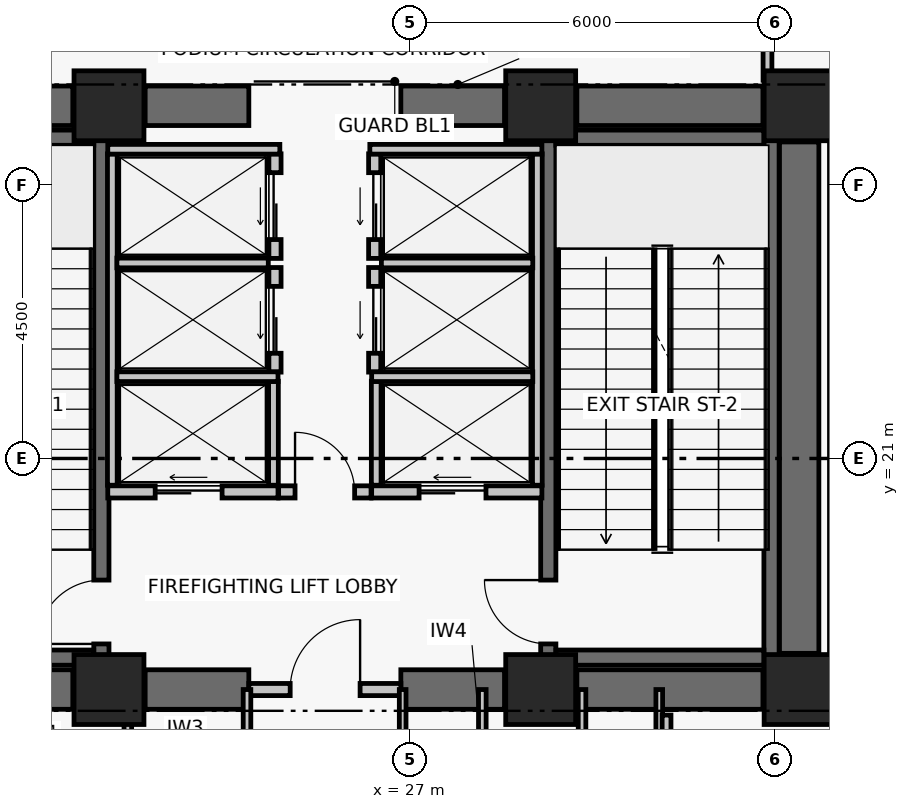
"""IFC4 building model, lengths in metres.
Left out: names, types, materials, properties, quantities, classifications, styles, units other than length and angle.
Written with IfcOpenShell. Run it as: python <this file> out.ifc"""

import sys

from ifc_helpers import new_model, si_unit, direction, frame, frame_2d, origin, origin_2d, place, context, subcontext, project, spatial, rectangle, extrude, element, fill, save


model = new_model("IFC4")
c1 = context("Model", 3, precision=1e-05, world=origin(), true_north=direction((0.0, 1.0)))
c2 = subcontext(c1, "Body", "Model", "MODEL_VIEW")
j1 = project(units=[si_unit("LENGTHUNIT", "METRE"), si_unit("PLANEANGLEUNIT", "RADIAN")], contexts=[c1])
p1 = place(None, origin())
s1 = spatial("IfcSite", under=j1, at=p1, CompositionType="ELEMENT")
p2 = place(p1, origin())
s2 = spatial("IfcBuilding", under=s1, at=p2, CompositionType="ELEMENT")
p3 = place(p2, frame((0.0, 0.0, 22.8)))
s3 = spatial("IfcBuildingStorey", under=s2, at=p3, CompositionType="ELEMENT", Elevation=22.8)
for number, where, z_axis, x_axis in (
    (1, (22.05, 17.2, 0.0), (0.0, 0.0, 1.0), (1.0, 0.0, 0.0)),
    (2, (29.15, 17.2, 0.0), (0.0, 0.0, 1.0), (1.0, 0.0, 0.0)),
    (3, (33.4, 17.2, 0.0), (0.0, 0.0, 1.0), (1.0, 0.0, 0.0)),
    (4, (22.05, 26.8, 0.0), (0.0, 0.0, 1.0), (1.0, 0.0, 0.0)),
    (5, (29.15, 26.8, 0.0), (0.0, 0.0, 1.0), (1.0, 0.0, 0.0)),
    (6, (33.4, 26.8, 0.0), (0.0, 0.0, 1.0), (1.0, 0.0, 0.0)),
):
    element("IfcColumn", number, at=place(p3, frame(where, z_axis=z_axis, x_axis=x_axis)), inside=s3, PredefinedType="COLUMN", context=c2, shape_type="SweptSolid", body=[
        extrude(rectangle(XDim=1.15, YDim=1.15, at=origin_2d()), origin(), (0.0, 0.0, 1.0), 4.8),
    ])
p4 = place(p3, frame((18.395, 17.2, 0.0), z_axis=(0.0, 0.0, 1.0), x_axis=(1.0, 0.0, 0.0)))
e7 = element("IfcWall", 7, at=p4, inside=s3, PredefinedType="SHEAR", context=c2, shape_type="SweptSolid", body=[
    extrude(rectangle(XDim=3.06, YDim=0.65, at=frame_2d((1.53, 0.0))), origin(), (0.0, 0.0, 1.0), 4.55),
])
p5 = place(p3, frame((22.645, 17.2, 0.0), z_axis=(0.0, 0.0, 1.0), x_axis=(1.0, 0.0, 0.0)))
e8 = element("IfcWall", 8, at=p5, inside=s3, PredefinedType="SHEAR", context=c2, shape_type="SweptSolid", body=[
    extrude(rectangle(XDim=1.705, YDim=0.65, at=frame_2d((0.853, 0.0))), origin(), (0.0, 0.0, 1.0), 4.55),
])
p6 = place(p3, frame((26.85, 17.2, 0.0), z_axis=(0.0, 0.0, 1.0), x_axis=(1.0, 0.0, 0.0)))
e9 = element("IfcWall", 9, at=p6, inside=s3, PredefinedType="SHEAR", context=c2, shape_type="SweptSolid", body=[
    extrude(rectangle(XDim=1.705, YDim=0.65, at=frame_2d((0.853, 0.0))), origin(), (0.0, 0.0, 1.0), 4.55),
])
p7 = place(p3, frame((29.745, 17.2, 0.0), z_axis=(0.0, 0.0, 1.0), x_axis=(1.0, 0.0, 0.0)))
e10 = element("IfcWall", 10, at=p7, inside=s3, PredefinedType="SHEAR", context=c2, shape_type="SweptSolid", body=[
    extrude(rectangle(XDim=3.06, YDim=0.65, at=frame_2d((1.53, 0.0))), origin(), (0.0, 0.0, 1.0), 4.55),
])
p8 = place(p3, frame((18.395, 26.8, 0.0), z_axis=(0.0, 0.0, 1.0), x_axis=(1.0, 0.0, 0.0)))
e11 = element("IfcWall", 11, at=p8, inside=s3, PredefinedType="SHEAR", context=c2, shape_type="SweptSolid", body=[
    extrude(rectangle(XDim=3.06, YDim=0.65, at=frame_2d((1.53, 0.0))), origin(), (0.0, 0.0, 1.0), 4.55),
])
p9 = place(p3, frame((22.645, 26.8, 0.0), z_axis=(0.0, 0.0, 1.0), x_axis=(1.0, 0.0, 0.0)))
e12 = element("IfcWall", 12, at=p9, inside=s3, PredefinedType="SHEAR", context=c2, shape_type="SweptSolid", body=[
    extrude(rectangle(XDim=1.705, YDim=0.65, at=frame_2d((0.853, 0.0))), origin(), (0.0, 0.0, 1.0), 4.55),
])
p10 = place(p3, frame((26.85, 26.8, 0.0), z_axis=(0.0, 0.0, 1.0), x_axis=(1.0, 0.0, 0.0)))
e13 = element("IfcWall", 13, at=p10, inside=s3, PredefinedType="SHEAR", context=c2, shape_type="SweptSolid", body=[
    extrude(rectangle(XDim=1.705, YDim=0.65, at=frame_2d((0.853, 0.0))), origin(), (0.0, 0.0, 1.0), 4.55),
])
p11 = place(p3, frame((29.745, 26.8, 0.0), z_axis=(0.0, 0.0, 1.0), x_axis=(1.0, 0.0, 0.0)))
e14 = element("IfcWall", 14, at=p11, inside=s3, PredefinedType="SHEAR", context=c2, shape_type="SweptSolid", body=[
    extrude(rectangle(XDim=3.06, YDim=0.65, at=frame_2d((1.53, 0.0))), origin(), (0.0, 0.0, 1.0), 4.55),
])
p12 = place(p3, frame((33.4, 17.795, 0.0), z_axis=(0.0, 0.0, 1.0), x_axis=(0.0, 1.0, 0.0)))
e15 = element("IfcWall", 15, at=p12, inside=s3, PredefinedType="SHEAR", context=c2, shape_type="SweptSolid", body=[
    extrude(rectangle(XDim=8.41, YDim=0.65, at=frame_2d((4.205, 0.0))), origin(), (0.0, 0.0, 1.0), 4.55),
])
p13 = place(p3, frame((21.925, 17.6, 0.0), z_axis=(0.0, 0.0, 1.0), x_axis=(0.0, 1.0, 0.0)))
e16 = element("IfcWall", 16, at=p13, inside=s3, PredefinedType="SHEAR", context=c2, shape_type="SweptSolid", body=[
    extrude(rectangle(XDim=8.8, YDim=0.25, at=frame_2d((4.4, 0.0))), origin(), (0.0, 0.0, 1.0), 4.55),
])
p14 = place(p13, frame((0.35, 0.0, 0.0)))
e17 = element("IfcOpeningElement", 17, at=p14, cuts=e16, PredefinedType="OPENING", context=c2, shape_type="SweptSolid", body=[
    extrude(rectangle(XDim=1.05, YDim=2.08, at=frame_2d((0.525, 1.04))), frame((0.0, 0.135, 0.0), z_axis=(0.0, -1.0, 0.0), x_axis=(1.0, 0.0, 0.0)), (0.0, 0.0, 1.0), 0.27),
])
for number, where, z_axis, x_axis in (
    (18, (18.379, 17.725, 0.0), (0.0, 0.0, 1.0), (1.0, 0.0, 0.0)),
    (19, (18.379, 26.275, 0.0), (0.0, 0.0, 1.0), (1.0, 0.0, 0.0)),
):
    element("IfcWall", number, at=place(p3, frame(where, z_axis=z_axis, x_axis=x_axis)), inside=s3, PredefinedType="SHEAR", context=c2, shape_type="SweptSolid", body=[
        extrude(rectangle(XDim=3.421, YDim=0.25, at=frame_2d((1.71, 0.0))), origin(), (0.0, 0.0, 1.0), 4.55),
    ])
p15 = place(p3, frame((29.275, 17.6, 0.0), z_axis=(0.0, 0.0, 1.0), x_axis=(0.0, 1.0, 0.0)))
e20 = element("IfcWall", 20, at=p15, inside=s3, PredefinedType="SHEAR", context=c2, shape_type="SweptSolid", body=[
    extrude(rectangle(XDim=8.8, YDim=0.25, at=frame_2d((4.4, 0.0))), origin(), (0.0, 0.0, 1.0), 4.55),
])
p16 = place(p15, frame((0.35, 0.0, 0.0)))
e21 = element("IfcOpeningElement", 21, at=p16, cuts=e20, PredefinedType="OPENING", context=c2, shape_type="SweptSolid", body=[
    extrude(rectangle(XDim=1.05, YDim=2.08, at=frame_2d((0.525, 1.04))), frame((0.0, 0.135, 0.0), z_axis=(0.0, -1.0, 0.0), x_axis=(1.0, 0.0, 0.0)), (0.0, 0.0, 1.0), 0.27),
])
p17 = place(p3, frame((32.946, 17.6, 0.0), z_axis=(0.0, 0.0, 1.0), x_axis=(0.0, 1.0, 0.0)))
e22 = element("IfcWall", 22, at=p17, inside=s3, PredefinedType="SHEAR", context=c2, shape_type="SweptSolid", body=[
    extrude(rectangle(XDim=8.8, YDim=0.25, at=frame_2d((4.4, 0.0))), origin(), (0.0, 0.0, 1.0), 4.55),
])
for number, where, z_axis, x_axis in (
    (23, (29.4, 17.725, 0.0), (0.0, 0.0, 1.0), (1.0, 0.0, 0.0)),
    (24, (29.4, 26.275, 0.0), (0.0, 0.0, 1.0), (1.0, 0.0, 0.0)),
):
    element("IfcWall", number, at=place(p3, frame(where, z_axis=z_axis, x_axis=x_axis)), inside=s3, PredefinedType="SHEAR", context=c2, shape_type="SweptSolid", body=[
        extrude(rectangle(XDim=3.421, YDim=0.25, at=frame_2d((1.71, 0.0))), origin(), (0.0, 0.0, 1.0), 4.55),
    ])
p18 = place(p3, frame((24.35, 17.2, 0.0), z_axis=(0.0, 0.0, 1.0), x_axis=(1.0, 0.0, 0.0)))
e25 = element("IfcWall", 25, at=p18, inside=s3, PredefinedType="PARTITIONING", context=c2, shape_type="SweptSolid", body=[
    extrude(rectangle(XDim=2.5, YDim=0.2, at=frame_2d((1.25, 0.0))), origin(), (0.0, 0.0, 1.0), 3.68),
])
p19 = place(p18, frame((0.68, 0.0, 0.0)))
e26 = element("IfcOpeningElement", 26, at=p19, cuts=e25, PredefinedType="OPENING", context=c2, shape_type="SweptSolid", body=[
    extrude(rectangle(XDim=1.15, YDim=2.08, at=frame_2d((0.575, 1.04))), frame((0.0, 0.11, 0.0), z_axis=(0.0, -1.0, 0.0), x_axis=(1.0, 0.0, 0.0)), (0.0, 0.0, 1.0), 0.22),
])
p20 = place(p3, frame((24.84, 20.45, 0.0), z_axis=(0.0, 0.0, 1.0), x_axis=(1.0, 0.0, 0.0)))
e27 = element("IfcWall", 27, at=p20, inside=s3, PredefinedType="PARTITIONING", context=c2, shape_type="SweptSolid", body=[
    extrude(rectangle(XDim=1.52, YDim=0.2, at=frame_2d((0.76, 0.0))), origin(), (0.0, 0.0, 1.0), 4.55),
])
p21 = place(p20, frame((0.27, 0.0, 0.0)))
e28 = element("IfcOpeningElement", 28, at=p21, cuts=e27, PredefinedType="OPENING", context=c2, shape_type="SweptSolid", body=[
    extrude(rectangle(XDim=0.98, YDim=2.06, at=frame_2d((0.49, 1.03))), frame((0.0, 0.11, 0.0), z_axis=(0.0, -1.0, 0.0), x_axis=(1.0, 0.0, 0.0)), (0.0, 0.0, 1.0), 0.22),
])
p22 = place(p3, frame((22.03, 20.45, 0.0), z_axis=(0.0, 0.0, 1.0), x_axis=(1.0, 0.0, 0.0)))
e29 = element("IfcWall", 29, at=p22, inside=s3, PredefinedType="PARTITIONING", context=c2, shape_type="SweptSolid", body=[
    extrude(rectangle(XDim=2.8, YDim=0.2, at=frame_2d((1.4, 0.0))), origin(), (0.0, 0.0, 1.0), 4.55),
])
p23 = place(p22, frame((0.78, 0.0, 0.0)))
e30 = element("IfcOpeningElement", 30, at=p23, cuts=e29, PredefinedType="OPENING", context=c2, shape_type="SweptSolid", body=[
    extrude(rectangle(XDim=1.1, YDim=2.08, at=frame_2d((0.55, 1.04))), frame((0.0, 0.11, 0.0), z_axis=(0.0, -1.0, 0.0), x_axis=(1.0, 0.0, 0.0)), (0.0, 0.0, 1.0), 0.22),
])
p24 = place(p3, frame((26.37, 20.45, 0.0), z_axis=(0.0, 0.0, 1.0), x_axis=(1.0, 0.0, 0.0)))
e31 = element("IfcWall", 31, at=p24, inside=s3, PredefinedType="PARTITIONING", context=c2, shape_type="SweptSolid", body=[
    extrude(rectangle(XDim=2.8, YDim=0.2, at=frame_2d((1.4, 0.0))), origin(), (0.0, 0.0, 1.0), 4.55),
])
p25 = place(p24, frame((0.78, 0.0, 0.0)))
e32 = element("IfcOpeningElement", 32, at=p25, cuts=e31, PredefinedType="OPENING", context=c2, shape_type="SweptSolid", body=[
    extrude(rectangle(XDim=1.1, YDim=2.08, at=frame_2d((0.55, 1.04))), frame((0.0, 0.11, 0.0), z_axis=(0.0, -1.0, 0.0), x_axis=(1.0, 0.0, 0.0)), (0.0, 0.0, 1.0), 0.22),
])
p26 = place(p3, frame((24.78, 22.42, 0.0), z_axis=(0.0, 0.0, 1.0), x_axis=(0.0, 1.0, 0.0)))
e33 = element("IfcWall", 33, at=p26, inside=s3, PredefinedType="PARTITIONING", context=c2, shape_type="SweptSolid", body=[
    extrude(rectangle(XDim=1.72, YDim=0.2, at=frame_2d((0.86, 0.0))), origin(), (0.0, 0.0, 1.0), 4.55),
])
p27 = place(p26, frame((0.31, 0.0, 0.0)))
e34 = element("IfcOpeningElement", 34, at=p27, cuts=e33, PredefinedType="OPENING", context=c2, shape_type="SweptSolid", body=[
    extrude(rectangle(XDim=1.1, YDim=2.08, at=frame_2d((0.55, 1.04))), frame((0.0, 0.11, 0.0), z_axis=(0.0, -1.0, 0.0), x_axis=(1.0, 0.0, 0.0)), (0.0, 0.0, 1.0), 0.22),
])
p28 = place(p3, frame((24.78, 24.29, 0.0), z_axis=(0.0, 0.0, 1.0), x_axis=(0.0, 1.0, 0.0)))
e35 = element("IfcWall", 35, at=p28, inside=s3, PredefinedType="PARTITIONING", context=c2, shape_type="SweptSolid", body=[
    extrude(rectangle(XDim=1.72, YDim=0.2, at=frame_2d((0.86, 0.0))), origin(), (0.0, 0.0, 1.0), 4.55),
])
p29 = place(p28, frame((0.31, 0.0, 0.0)))
e36 = element("IfcOpeningElement", 36, at=p29, cuts=e35, PredefinedType="OPENING", context=c2, shape_type="SweptSolid", body=[
    extrude(rectangle(XDim=1.1, YDim=2.08, at=frame_2d((0.55, 1.04))), frame((0.0, 0.11, 0.0), z_axis=(0.0, -1.0, 0.0), x_axis=(1.0, 0.0, 0.0)), (0.0, 0.0, 1.0), 0.22),
])
p30 = place(p3, frame((26.42, 22.42, 0.0), z_axis=(0.0, 0.0, 1.0), x_axis=(0.0, 1.0, 0.0)))
e37 = element("IfcWall", 37, at=p30, inside=s3, PredefinedType="PARTITIONING", context=c2, shape_type="SweptSolid", body=[
    extrude(rectangle(XDim=1.72, YDim=0.2, at=frame_2d((0.86, 0.0))), origin(), (0.0, 0.0, 1.0), 4.55),
])
p31 = place(p30, frame((0.31, 0.0, 0.0)))
e38 = element("IfcOpeningElement", 38, at=p31, cuts=e37, PredefinedType="OPENING", context=c2, shape_type="SweptSolid", body=[
    extrude(rectangle(XDim=1.1, YDim=2.08, at=frame_2d((0.55, 1.04))), frame((0.0, 0.11, 0.0), z_axis=(0.0, -1.0, 0.0), x_axis=(1.0, 0.0, 0.0)), (0.0, 0.0, 1.0), 0.22),
])
p32 = place(p3, frame((26.42, 24.29, 0.0), z_axis=(0.0, 0.0, 1.0), x_axis=(0.0, 1.0, 0.0)))
e39 = element("IfcWall", 39, at=p32, inside=s3, PredefinedType="PARTITIONING", context=c2, shape_type="SweptSolid", body=[
    extrude(rectangle(XDim=1.72, YDim=0.2, at=frame_2d((0.86, 0.0))), origin(), (0.0, 0.0, 1.0), 4.55),
])
p33 = place(p32, frame((0.31, 0.0, 0.0)))
e40 = element("IfcOpeningElement", 40, at=p33, cuts=e39, PredefinedType="OPENING", context=c2, shape_type="SweptSolid", body=[
    extrude(rectangle(XDim=1.1, YDim=2.08, at=frame_2d((0.55, 1.04))), frame((0.0, 0.11, 0.0), z_axis=(0.0, -1.0, 0.0), x_axis=(1.0, 0.0, 0.0)), (0.0, 0.0, 1.0), 0.22),
])
p34 = place(p3, frame((22.105, 20.56, 0.0), z_axis=(0.0, 0.0, 1.0), x_axis=(0.0, 1.0, 0.0)))
e41 = element("IfcWall", 41, at=p34, inside=s3, PredefinedType="PARTITIONING", context=c2, shape_type="SweptSolid", body=[
    extrude(rectangle(XDim=5.45, YDim=0.16, at=frame_2d((2.725, 0.0))), origin(), (0.0, 0.0, 1.0), 4.55),
])
p35 = place(p3, frame((24.755, 20.56, 0.0), z_axis=(0.0, 0.0, 1.0), x_axis=(0.0, 1.0, 0.0)))
e42 = element("IfcWall", 42, at=p35, inside=s3, PredefinedType="PARTITIONING", context=c2, shape_type="SweptSolid", body=[
    extrude(rectangle(XDim=1.71, YDim=0.16, at=frame_2d((0.855, 0.0))), origin(), (0.0, 0.0, 1.0), 4.55),
])
p36 = place(p3, frame((22.18, 22.345, 0.0), z_axis=(0.0, 0.0, 1.0), x_axis=(1.0, 0.0, 0.0)))
e43 = element("IfcWall", 43, at=p36, inside=s3, PredefinedType="PARTITIONING", context=c2, shape_type="SweptSolid", body=[
    extrude(rectangle(XDim=2.65, YDim=0.16, at=frame_2d((1.325, 0.0))), origin(), (0.0, 0.0, 1.0), 4.55),
])
p37 = place(p3, frame((22.18, 24.215, 0.0), z_axis=(0.0, 0.0, 1.0), x_axis=(1.0, 0.0, 0.0)))
e44 = element("IfcWall", 44, at=p37, inside=s3, PredefinedType="PARTITIONING", context=c2, shape_type="SweptSolid", body=[
    extrude(rectangle(XDim=2.49, YDim=0.16, at=frame_2d((1.245, 0.0))), origin(), (0.0, 0.0, 1.0), 4.55),
])
p38 = place(p3, frame((22.03, 26.085, 0.0), z_axis=(0.0, 0.0, 1.0), x_axis=(1.0, 0.0, 0.0)))
e45 = element("IfcWall", 45, at=p38, inside=s3, PredefinedType="PARTITIONING", context=c2, shape_type="SweptSolid", body=[
    extrude(rectangle(XDim=2.83, YDim=0.16, at=frame_2d((1.415, 0.0))), origin(), (0.0, 0.0, 1.0), 4.55),
])
p39 = place(p3, frame((29.095, 20.56, 0.0), z_axis=(0.0, 0.0, 1.0), x_axis=(0.0, 1.0, 0.0)))
e46 = element("IfcWall", 46, at=p39, inside=s3, PredefinedType="PARTITIONING", context=c2, shape_type="SweptSolid", body=[
    extrude(rectangle(XDim=5.45, YDim=0.16, at=frame_2d((2.725, 0.0))), origin(), (0.0, 0.0, 1.0), 4.55),
])
p40 = place(p3, frame((26.445, 20.56, 0.0), z_axis=(0.0, 0.0, 1.0), x_axis=(0.0, 1.0, 0.0)))
e47 = element("IfcWall", 47, at=p40, inside=s3, PredefinedType="PARTITIONING", context=c2, shape_type="SweptSolid", body=[
    extrude(rectangle(XDim=1.71, YDim=0.16, at=frame_2d((0.855, 0.0))), origin(), (0.0, 0.0, 1.0), 4.55),
])
p41 = place(p3, frame((26.37, 22.345, 0.0), z_axis=(0.0, 0.0, 1.0), x_axis=(1.0, 0.0, 0.0)))
e48 = element("IfcWall", 48, at=p41, inside=s3, PredefinedType="PARTITIONING", context=c2, shape_type="SweptSolid", body=[
    extrude(rectangle(XDim=2.65, YDim=0.16, at=frame_2d((1.325, 0.0))), origin(), (0.0, 0.0, 1.0), 4.55),
])
p42 = place(p3, frame((26.53, 24.215, 0.0), z_axis=(0.0, 0.0, 1.0), x_axis=(1.0, 0.0, 0.0)))
e49 = element("IfcWall", 49, at=p42, inside=s3, PredefinedType="PARTITIONING", context=c2, shape_type="SweptSolid", body=[
    extrude(rectangle(XDim=2.49, YDim=0.16, at=frame_2d((1.245, 0.0))), origin(), (0.0, 0.0, 1.0), 4.55),
])
p43 = place(p3, frame((26.34, 26.085, 0.0), z_axis=(0.0, 0.0, 1.0), x_axis=(1.0, 0.0, 0.0)))
e50 = element("IfcWall", 50, at=p43, inside=s3, PredefinedType="PARTITIONING", context=c2, shape_type="SweptSolid", body=[
    extrude(rectangle(XDim=2.83, YDim=0.16, at=frame_2d((1.415, 0.0))), origin(), (0.0, 0.0, 1.0), 4.55),
])
p44 = place(p3, frame((22.36, 14.95, 0.0), z_axis=(0.0, 0.0, 1.0), x_axis=(0.0, 1.0, 0.0)))
e51 = element("IfcWall", 51, at=p44, inside=s3, PredefinedType="PARTITIONING", context=c2, shape_type="SweptSolid", body=[
    extrude(rectangle(XDim=2.25, YDim=0.125, at=frame_2d((1.125, 0.0))), origin(), (0.0, 0.0, 1.0), 3.13),
])
p45 = place(p3, frame((24.32, 14.95, 0.0), z_axis=(0.0, 0.0, 1.0), x_axis=(0.0, 1.0, 0.0)))
e52 = element("IfcWall", 52, at=p45, inside=s3, PredefinedType="PARTITIONING", context=c2, shape_type="SweptSolid", body=[
    extrude(rectangle(XDim=2.25, YDim=0.125, at=frame_2d((1.125, 0.0))), origin(), (0.0, 0.0, 1.0), 3.68),
])
p46 = place(p3, frame((26.88, 14.95, 0.0), z_axis=(0.0, 0.0, 1.0), x_axis=(0.0, 1.0, 0.0)))
e53 = element("IfcWall", 53, at=p46, inside=s3, PredefinedType="PARTITIONING", context=c2, shape_type="SweptSolid", body=[
    extrude(rectangle(XDim=2.25, YDim=0.11, at=frame_2d((1.125, 0.0))), origin(), (0.0, 0.0, 1.0), 3.68),
])
for number, where, z_axis, x_axis in (
    (54, (28.19, 14.95, 0.0), (0.0, 0.0, 1.0), (0.0, 1.0, 0.0)),
    (55, (29.83, 14.95, 0.0), (0.0, 0.0, 1.0), (0.0, 1.0, 0.0)),
):
    element("IfcWall", number, at=place(p3, frame(where, z_axis=z_axis, x_axis=x_axis)), inside=s3, PredefinedType="PARTITIONING", context=c2, shape_type="SweptSolid", body=[
        extrude(rectangle(XDim=2.25, YDim=0.125, at=frame_2d((1.125, 0.0))), origin(), (0.0, 0.0, 1.0), 3.68),
    ])
p47 = place(p3, frame((31.1, 14.95, 0.0), z_axis=(0.0, 0.0, 1.0), x_axis=(0.0, 1.0, 0.0)))
e56 = element("IfcWall", 56, at=p47, inside=s3, PredefinedType="PARTITIONING", context=c2, shape_type="SweptSolid", body=[
    extrude(rectangle(XDim=2.25, YDim=0.11, at=frame_2d((1.125, 0.0))), origin(), (0.0, 0.0, 1.0), 3.68),
])
p48 = place(p3, frame((31.22, 14.93, 0.0), z_axis=(0.0, 0.0, 1.0), x_axis=(0.0, 1.0, 0.0)))
e57 = element("IfcWall", 57, at=p48, inside=s3, PredefinedType="PARTITIONING", context=c2, shape_type="SweptSolid", body=[
    extrude(rectangle(XDim=1.85, YDim=0.145, at=frame_2d((0.925, 0.0))), origin(), (0.0, 0.0, 1.0), 3.68),
])
p49 = place(p3, frame((33.74, 27.22, 0.0), z_axis=(0.0, 0.0, 1.0), x_axis=(-1.0, 0.0, 0.0)))
e58 = element("IfcWall", 58, at=p49, inside=s3, PredefinedType="PARTITIONING", context=c2, shape_type="SweptSolid", body=[
    extrude(rectangle(XDim=0.86, YDim=0.145, at=frame_2d((0.43, 0.0))), origin(), (0.0, 0.0, 1.0), 3.13),
])
p50 = place(p3, frame((32.88, 27.22, 0.0), z_axis=(0.0, 0.0, 1.0), x_axis=(0.0, 1.0, 0.0)))
e59 = element("IfcWall", 59, at=p50, inside=s3, PredefinedType="PARTITIONING", context=c2, shape_type="SweptSolid", body=[
    extrude(rectangle(XDim=1.48, YDim=0.145, at=frame_2d((0.74, 0.0))), origin(), (0.0, 0.0, 1.0), 3.68),
])
p51 = place(p14, origin())
e60 = element("IfcDoor", 60, at=p51, inside=s3, OperationType="SINGLE_SWING_LEFT", PredefinedType="DOOR", context=c2, shape_type="SweptSolid", body=[
    extrude(rectangle(XDim=1.05, YDim=2.08, at=frame_2d((0.525, 1.04))), frame((0.0, 0.025, 0.0), z_axis=(0.0, -1.0, 0.0), x_axis=(1.0, 0.0, 0.0)), (0.0, 0.0, 1.0), 0.05),
])
fill(e17, e60)
p52 = place(p16, origin())
e61 = element("IfcDoor", 61, at=p52, inside=s3, OperationType="SINGLE_SWING_RIGHT", PredefinedType="DOOR", context=c2, shape_type="SweptSolid", body=[
    extrude(rectangle(XDim=1.05, YDim=2.08, at=frame_2d((0.525, 1.04))), frame((0.0, 0.025, 0.0), z_axis=(0.0, -1.0, 0.0), x_axis=(1.0, 0.0, 0.0)), (0.0, 0.0, 1.0), 0.05),
])
fill(e21, e61)
p53 = place(p19, origin())
e62 = element("IfcDoor", 62, at=p53, inside=s3, OperationType="SINGLE_SWING_RIGHT", PredefinedType="DOOR", context=c2, shape_type="SweptSolid", body=[
    extrude(rectangle(XDim=1.15, YDim=2.08, at=frame_2d((0.575, 1.04))), frame((0.0, 0.025, 0.0), z_axis=(0.0, -1.0, 0.0), x_axis=(1.0, 0.0, 0.0)), (0.0, 0.0, 1.0), 0.05),
])
fill(e26, e62)
p54 = place(p21, origin())
e63 = element("IfcDoor", 63, at=p54, inside=s3, OperationType="SINGLE_SWING_LEFT", PredefinedType="DOOR", context=c2, shape_type="SweptSolid", body=[
    extrude(rectangle(XDim=0.98, YDim=2.06, at=frame_2d((0.49, 1.03))), frame((0.0, 0.025, 0.0), z_axis=(0.0, -1.0, 0.0), x_axis=(1.0, 0.0, 0.0)), (0.0, 0.0, 1.0), 0.05),
])
fill(e28, e63)
p55 = place(p23, origin())
e64 = element("IfcDoor", 64, at=p55, inside=s3, OperationType="DOUBLE_DOOR_SLIDING", PredefinedType="DOOR", context=c2, shape_type="SweptSolid", body=[
    extrude(rectangle(XDim=1.1, YDim=2.08, at=frame_2d((0.55, 1.04))), frame((0.0, 0.025, 0.0), z_axis=(0.0, -1.0, 0.0), x_axis=(1.0, 0.0, 0.0)), (0.0, 0.0, 1.0), 0.05),
])
fill(e30, e64)
p56 = place(p25, origin())
e65 = element("IfcDoor", 65, at=p56, inside=s3, OperationType="DOUBLE_DOOR_SLIDING", PredefinedType="DOOR", context=c2, shape_type="SweptSolid", body=[
    extrude(rectangle(XDim=1.1, YDim=2.08, at=frame_2d((0.55, 1.04))), frame((0.0, 0.025, 0.0), z_axis=(0.0, -1.0, 0.0), x_axis=(1.0, 0.0, 0.0)), (0.0, 0.0, 1.0), 0.05),
])
fill(e32, e65)
p57 = place(p27, origin())
e66 = element("IfcDoor", 66, at=p57, inside=s3, OperationType="DOUBLE_DOOR_SLIDING", PredefinedType="DOOR", context=c2, shape_type="SweptSolid", body=[
    extrude(rectangle(XDim=1.1, YDim=2.08, at=frame_2d((0.55, 1.04))), frame((0.0, 0.025, 0.0), z_axis=(0.0, -1.0, 0.0), x_axis=(1.0, 0.0, 0.0)), (0.0, 0.0, 1.0), 0.05),
])
fill(e34, e66)
p58 = place(p29, origin())
e67 = element("IfcDoor", 67, at=p58, inside=s3, OperationType="DOUBLE_DOOR_SLIDING", PredefinedType="DOOR", context=c2, shape_type="SweptSolid", body=[
    extrude(rectangle(XDim=1.1, YDim=2.08, at=frame_2d((0.55, 1.04))), frame((0.0, 0.025, 0.0), z_axis=(0.0, -1.0, 0.0), x_axis=(1.0, 0.0, 0.0)), (0.0, 0.0, 1.0), 0.05),
])
fill(e36, e67)
p59 = place(p31, origin())
e68 = element("IfcDoor", 68, at=p59, inside=s3, OperationType="DOUBLE_DOOR_SLIDING", PredefinedType="DOOR", context=c2, shape_type="SweptSolid", body=[
    extrude(rectangle(XDim=1.1, YDim=2.08, at=frame_2d((0.55, 1.04))), frame((0.0, 0.025, 0.0), z_axis=(0.0, -1.0, 0.0), x_axis=(1.0, 0.0, 0.0)), (0.0, 0.0, 1.0), 0.05),
])
fill(e38, e68)
p60 = place(p33, origin())
e69 = element("IfcDoor", 69, at=p60, inside=s3, OperationType="DOUBLE_DOOR_SLIDING", PredefinedType="DOOR", context=c2, shape_type="SweptSolid", body=[
    extrude(rectangle(XDim=1.1, YDim=2.08, at=frame_2d((0.55, 1.04))), frame((0.0, 0.025, 0.0), z_axis=(0.0, -1.0, 0.0), x_axis=(1.0, 0.0, 0.0)), (0.0, 0.0, 1.0), 0.05),
])
fill(e40, e69)
save(model, sys.argv[1])
